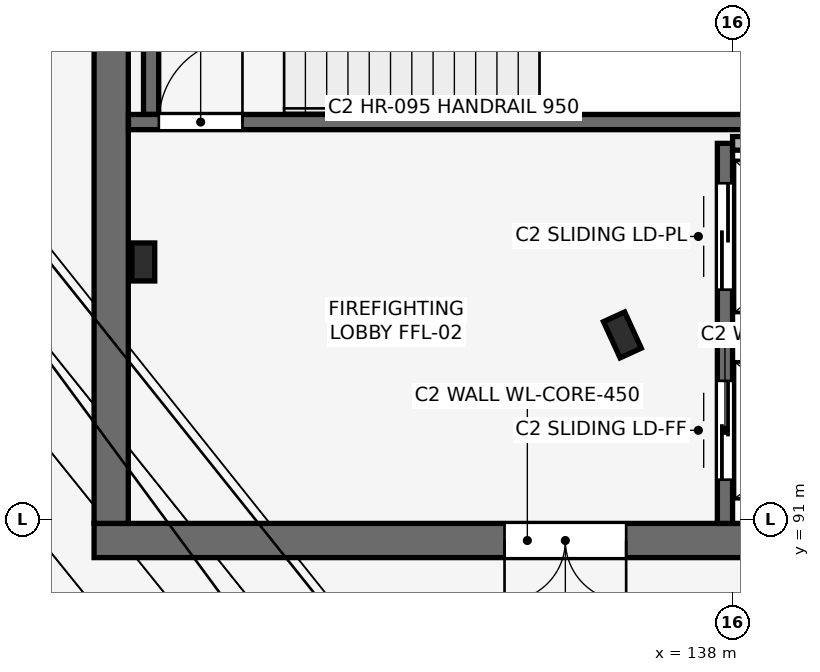
"""IFC4 building model, lengths in metres.
Left out: names, types, materials, properties, quantities, classifications, styles, units other than length and angle.
Written with IfcOpenShell. Run it as: python <this file> out.ifc"""

import sys

from ifc_helpers import new_model, si_unit, direction, frame, frame_2d, origin, origin_2d, place, context, subcontext, project, spatial, rectangle, i_section, extrude, element, fill, save


model = new_model("IFC4")
c1 = context("Model", 3, precision=1e-05, world=origin(), true_north=direction((0.0, 1.0)))
c2 = subcontext(c1, "Body", "Model", "MODEL_VIEW")
j1 = project(units=[si_unit("LENGTHUNIT", "METRE"), si_unit("PLANEANGLEUNIT", "RADIAN")], contexts=[c1])
p1 = place(None, origin())
s1 = spatial("IfcSite", under=j1, at=p1, CompositionType="ELEMENT")
p2 = place(p1, origin())
s2 = spatial("IfcBuilding", under=s1, at=p2, CompositionType="ELEMENT")
p3 = place(p2, frame((0.0, 0.0, 15.0)))
s3 = spatial("IfcBuildingStorey", under=s2, at=p3, CompositionType="ELEMENT", Elevation=15.0)
p4 = place(p3, frame((136.55, 93.43, 0.0), z_axis=(0.0, 0.0, 1.0), x_axis=(0.909018020308, 0.416756810089, 0.0)))
e1 = element("IfcColumn", 1, at=p4, inside=s3, PredefinedType="COLUMN", context=c2, shape_type="SweptSolid", body=[
    extrude(i_section(OverallWidth=0.306, OverallDepth=0.524, WebThickness=0.021, FlangeThickness=0.04, FilletRadius=0.027, at=origin_2d()), origin(), (0.0, 0.0, 1.0), 4.5),
])
p5 = place(p3, frame((129.6, 90.725, 0.0), z_axis=(0.0, 0.0, 1.0), x_axis=(1.0, 0.0, 0.0)))
e2 = element("IfcWall", 2, at=p5, inside=s3, PredefinedType="SHEAR", context=c2, shape_type="SweptSolid", body=[
    extrude(rectangle(XDim=11.4, YDim=0.45, at=frame_2d((5.7, 0.0))), origin(), (0.0, 0.0, 1.0), 4.5),
])
p6 = place(p5, frame((5.4, 0.0, 0.0)))
e3 = element("IfcOpeningElement", 3, at=p6, cuts=e2, PredefinedType="OPENING", context=c2, shape_type="SweptSolid", body=[
    extrude(rectangle(XDim=1.6, YDim=2.2, at=frame_2d((0.8, 1.1))), frame((0.0, 0.235, 0.0), z_axis=(0.0, -1.0, 0.0), x_axis=(1.0, 0.0, 0.0)), (0.0, 0.0, 1.0), 0.47),
])
p7 = place(p3, frame((129.825, 90.95, 0.0), z_axis=(0.0, 0.0, 1.0), x_axis=(0.0, 1.0, 0.0)))
e4 = element("IfcWall", 4, at=p7, inside=s3, PredefinedType="SHEAR", context=c2, shape_type="SweptSolid", body=[
    extrude(rectangle(XDim=9.1, YDim=0.45, at=frame_2d((4.55, 0.0))), origin(), (0.0, 0.0, 1.0), 4.5),
])
p8 = place(p3, frame((130.248, 94.389, 0.0), z_axis=(0.0, 0.0, 1.0), x_axis=(1.0, 0.0, 0.0)))
e5 = element("IfcColumn", 5, at=p8, inside=s3, PredefinedType="COLUMN", context=c2, shape_type="SweptSolid", body=[
    extrude(i_section(OverallWidth=0.3, OverallDepth=0.5, WebThickness=0.014, FlangeThickness=0.028, FilletRadius=0.027, at=origin_2d()), origin(), (0.0, 0.0, 1.0), 4.5),
])
p9 = place(p3, frame((137.9, 90.95, 0.0), z_axis=(0.0, 0.0, 1.0), x_axis=(0.0, 1.0, 0.0)))
e6 = element("IfcWall", 6, at=p9, inside=s3, PredefinedType="SHEAR", context=c2, shape_type="SweptSolid", body=[
    extrude(rectangle(XDim=2.45, YDim=0.2, at=frame_2d((1.225, 0.0))), origin(), (0.0, 0.0, 1.0), 4.25),
])
p10 = place(p9, frame((0.575, 0.0, 0.0)))
e7 = element("IfcOpeningElement", 7, at=p10, cuts=e6, PredefinedType="OPENING", context=c2, shape_type="SweptSolid", body=[
    extrude(rectangle(XDim=1.3, YDim=2.2, at=frame_2d((0.65, 1.1))), frame((0.0, 0.11, 0.0), z_axis=(0.0, -1.0, 0.0), x_axis=(1.0, 0.0, 0.0)), (0.0, 0.0, 1.0), 0.22),
])
p11 = place(p3, frame((138.0, 93.4, 0.0), z_axis=(0.0, 0.0, 1.0), x_axis=(1.0, 0.0, 0.0)))
e8 = element("IfcWall", 8, at=p11, inside=s3, PredefinedType="PARTITIONING", context=c2, shape_type="SweptSolid", body=[
    extrude(rectangle(XDim=2.45, YDim=0.18, at=frame_2d((1.225, 0.0))), origin(), (0.0, 0.0, 1.0), 4.5),
])
p12 = place(p3, frame((137.9, 93.5, 0.0), z_axis=(0.0, 0.0, 1.0), x_axis=(0.0, 1.0, 0.0)))
e9 = element("IfcWall", 9, at=p12, inside=s3, PredefinedType="SHEAR", context=c2, shape_type="SweptSolid", body=[
    extrude(rectangle(XDim=2.45, YDim=0.2, at=frame_2d((1.225, 0.0))), origin(), (0.0, 0.0, 1.0), 4.25),
])
p13 = place(p12, frame((0.525, 0.0, 0.0)))
e10 = element("IfcOpeningElement", 10, at=p13, cuts=e9, PredefinedType="OPENING", context=c2, shape_type="SweptSolid", body=[
    extrude(rectangle(XDim=1.4, YDim=2.2, at=frame_2d((0.7, 1.1))), frame((0.0, 0.11, 0.0), z_axis=(0.0, -1.0, 0.0), x_axis=(1.0, 0.0, 0.0)), (0.0, 0.0, 1.0), 0.22),
])
p14 = place(p3, frame((138.0, 95.95, 0.0), z_axis=(0.0, 0.0, 1.0), x_axis=(1.0, 0.0, 0.0)))
e11 = element("IfcWall", 11, at=p14, inside=s3, PredefinedType="PARTITIONING", context=c2, shape_type="SweptSolid", body=[
    extrude(rectangle(XDim=2.45, YDim=0.18, at=frame_2d((1.225, 0.0))), origin(), (0.0, 0.0, 1.0), 4.5),
])
p15 = place(p3, frame((130.052, 96.23, 0.0), z_axis=(0.0, 0.0, 1.0), x_axis=(1.0, 0.0, 0.0)))
e12 = element("IfcWall", 12, at=p15, inside=s3, PredefinedType="SHEAR", context=c2, shape_type="SweptSolid", body=[
    extrude(rectangle(XDim=8.248, YDim=0.2, at=frame_2d((4.124, 0.0))), origin(), (0.0, 0.0, 1.0), 4.5),
])
p16 = place(p15, frame((0.4, 0.0, 0.0)))
e13 = element("IfcOpeningElement", 13, at=p16, cuts=e12, PredefinedType="OPENING", context=c2, shape_type="SweptSolid", body=[
    extrude(rectangle(XDim=1.1, YDim=2.15, at=frame_2d((0.55, 1.075))), frame((0.0, 0.11, 0.0), z_axis=(0.0, -1.0, 0.0), x_axis=(1.0, 0.0, 0.0)), (0.0, 0.0, 1.0), 0.22),
])
p17 = place(p3, frame((130.35, 96.332, 0.0), z_axis=(0.0, 0.0, 1.0), x_axis=(0.0, 1.0, 0.0)))
e14 = element("IfcWall", 14, at=p17, inside=s3, PredefinedType="SHEAR", context=c2, shape_type="SweptSolid", body=[
    extrude(rectangle(XDim=3.686, YDim=0.2, at=frame_2d((1.843, 0.0))), origin(), (0.0, 0.0, 1.0), 4.5),
])
p18 = place(p10, origin())
e15 = element("IfcDoor", 15, at=p18, inside=s3, OperationType="DOUBLE_DOOR_SLIDING", PredefinedType="DOOR", context=c2, shape_type="SweptSolid", body=[
    extrude(rectangle(XDim=1.3, YDim=2.2, at=frame_2d((0.65, 1.1))), frame((0.0, 0.025, 0.0), z_axis=(0.0, -1.0, 0.0), x_axis=(1.0, 0.0, 0.0)), (0.0, 0.0, 1.0), 0.05),
])
fill(e7, e15)
p19 = place(p13, origin())
e16 = element("IfcDoor", 16, at=p19, inside=s3, OperationType="DOUBLE_DOOR_SLIDING", PredefinedType="DOOR", context=c2, shape_type="SweptSolid", body=[
    extrude(rectangle(XDim=1.4, YDim=2.2, at=frame_2d((0.7, 1.1))), frame((0.0, 0.025, 0.0), z_axis=(0.0, -1.0, 0.0), x_axis=(1.0, 0.0, 0.0)), (0.0, 0.0, 1.0), 0.05),
])
fill(e10, e16)
p20 = place(p16, frame((1.1, 0.0, 0.0), z_axis=(0.0, 0.0, 1.0), x_axis=(-1.0, 0.0, 0.0)))
e17 = element("IfcDoor", 17, at=p20, inside=s3, OperationType="SINGLE_SWING_LEFT", PredefinedType="DOOR", context=c2, shape_type="SweptSolid", body=[
    extrude(rectangle(XDim=1.1, YDim=2.15, at=frame_2d((0.55, 1.075))), frame((0.0, 0.025, 0.0), z_axis=(0.0, -1.0, 0.0), x_axis=(1.0, 0.0, 0.0)), (0.0, 0.0, 1.0), 0.05),
])
fill(e13, e17)
p21 = place(p6, frame((1.6, 0.0, 0.0), z_axis=(0.0, 0.0, 1.0), x_axis=(-1.0, 0.0, 0.0)))
e18 = element("IfcDoor", 18, at=p21, inside=s3, OperationType="DOUBLE_DOOR_SINGLE_SWING", PredefinedType="DOOR", context=c2, shape_type="SweptSolid", body=[
    extrude(rectangle(XDim=1.6, YDim=2.2, at=frame_2d((0.8, 1.1))), frame((0.0, 0.025, 0.0), z_axis=(0.0, -1.0, 0.0), x_axis=(1.0, 0.0, 0.0)), (0.0, 0.0, 1.0), 0.05),
])
fill(e3, e18)
save(model, sys.argv[1])
